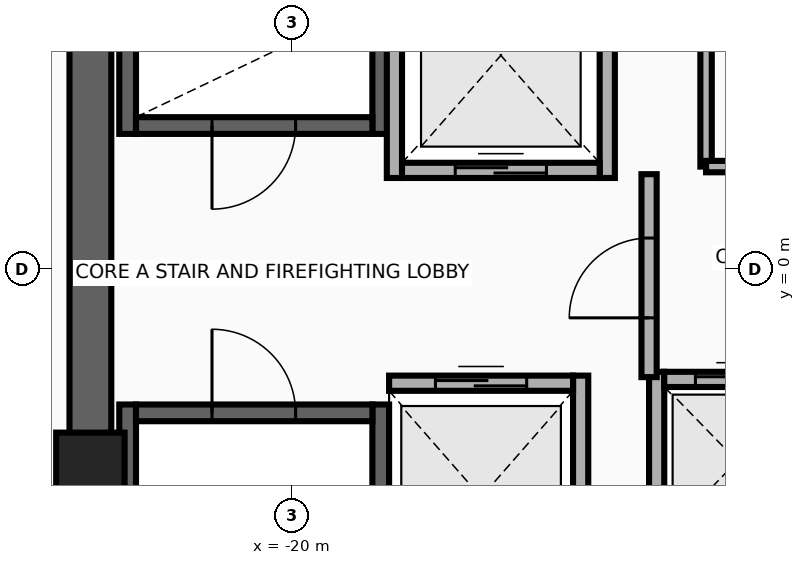
"""IFC4 building model, lengths in metres.
Left out: names, types, materials, properties, quantities, classifications, styles, units other than length and angle.
Written with IfcOpenShell. Run it as: python <this file> out.ifc"""

import sys

from ifc_helpers import new_model, si_unit, direction, frame, frame_2d, origin, origin_2d, place, context, subcontext, project, spatial, rectangle, extrude, source, transform, mapped, element, fill, save


model = new_model("IFC4")
c1 = context("Model", 3, precision=1e-05, world=origin(), true_north=direction((0.0, 1.0)))
c2 = subcontext(c1, "Body", "Model", "MODEL_VIEW")
j1 = project(units=[si_unit("LENGTHUNIT", "METRE"), si_unit("PLANEANGLEUNIT", "RADIAN")], contexts=[c1])
p1 = place(None, origin())
s1 = spatial("IfcSite", under=j1, at=p1, CompositionType="ELEMENT")
p2 = place(p1, origin())
s2 = spatial("IfcBuilding", under=s1, at=p2, CompositionType="ELEMENT")
p3 = place(p2, frame((0.0, 0.0, 223.0)))
s3 = spatial("IfcBuildingStorey", under=s2, at=p3, CompositionType="ELEMENT", Elevation=223.0)
for number, where, z_axis, x_axis in (
    (1, (-22.16, 1.78, 0.0), (0.0, 0.0, 1.0), (0.0, 1.0, 0.0)),
    (2, (-18.83, 1.78, 0.0), (0.0, 0.0, 1.0), (0.0, 1.0, 0.0)),
):
    element("IfcWall", number, at=place(p3, frame(where, z_axis=z_axis, x_axis=x_axis)), inside=s3, PredefinedType="SHEAR", context=c2, shape_type="SweptSolid", body=[
        extrude(rectangle(XDim=8.745, YDim=0.22, at=frame_2d((4.373, 0.0))), origin(), (0.0, 0.0, 1.0), 3.26),
    ])
p4 = place(p3, frame((-22.05, 1.89, 0.0), z_axis=(0.0, 0.0, 1.0), x_axis=(1.0, 0.0, 0.0)))
e3 = element("IfcWall", 3, at=p4, inside=s3, PredefinedType="SHEAR", context=c2, shape_type="SweptSolid", body=[
    extrude(rectangle(XDim=3.11, YDim=0.22, at=frame_2d((1.555, 0.0))), origin(), (0.0, 0.0, 1.0), 3.26),
])
p5 = place(p4, frame((1.0, 0.0, 0.0)))
e4 = element("IfcOpeningElement", 4, at=p5, cuts=e3, PredefinedType="OPENING", context=c2, shape_type="SweptSolid", body=[
    extrude(rectangle(XDim=1.1, YDim=2.15, at=frame_2d((0.55, 1.075))), frame((0.0, 0.125, 0.0), z_axis=(0.0, -1.0, 0.0), x_axis=(1.0, 0.0, 0.0)), (0.0, 0.0, 1.0), 0.25),
])
for number, where, z_axis, x_axis in (
    (5, (-22.16, -10.525, 0.0), (0.0, 0.0, 1.0), (0.0, 1.0, 0.0)),
    (6, (-18.83, -10.525, 0.0), (0.0, 0.0, 1.0), (0.0, 1.0, 0.0)),
):
    element("IfcWall", number, at=place(p3, frame(where, z_axis=z_axis, x_axis=x_axis)), inside=s3, PredefinedType="SHEAR", context=c2, shape_type="SweptSolid", body=[
        extrude(rectangle(XDim=8.745, YDim=0.22, at=frame_2d((4.373, 0.0))), origin(), (0.0, 0.0, 1.0), 3.26),
    ])
p6 = place(p3, frame((-22.05, -1.89, 0.0), z_axis=(0.0, 0.0, 1.0), x_axis=(1.0, 0.0, 0.0)))
e7 = element("IfcWall", 7, at=p6, inside=s3, PredefinedType="SHEAR", context=c2, shape_type="SweptSolid", body=[
    extrude(rectangle(XDim=3.11, YDim=0.22, at=frame_2d((1.555, 0.0))), origin(), (0.0, 0.0, 1.0), 3.26),
])
p7 = place(p6, frame((1.0, 0.0, 0.0)))
e8 = element("IfcOpeningElement", 8, at=p7, cuts=e7, PredefinedType="OPENING", context=c2, shape_type="SweptSolid", body=[
    extrude(rectangle(XDim=1.1, YDim=2.15, at=frame_2d((0.55, 1.075))), frame((0.0, 0.125, 0.0), z_axis=(0.0, -1.0, 0.0), x_axis=(1.0, 0.0, 0.0)), (0.0, 0.0, 1.0), 0.25),
])
p8 = place(p3, frame((-22.65, -11.075, 0.0), z_axis=(0.0, 0.0, 1.0), x_axis=(0.0, 1.0, 0.0)))
e9 = element("IfcWall", 9, at=p8, inside=s3, PredefinedType="SHEAR", context=c2, shape_type="SweptSolid", body=[
    extrude(rectangle(XDim=22.15, YDim=0.55, at=frame_2d((11.075, 0.0))), origin(), (0.0, 0.0, 1.0), 3.26),
])
m1 = source(origin(), c2, "Body", "SweptSolid", [
    extrude(rectangle(XDim=0.9, YDim=0.9, at=origin_2d()), origin(), (0.0, 0.0, 1.0), 3.5),
])
p9 = place(p3, frame((-22.65, -2.6, 0.0), z_axis=(0.0, 0.0, 1.0), x_axis=(1.0, 0.0, 0.0)))
e10 = element("IfcColumn", 10, at=p9, inside=s3, PredefinedType="COLUMN", context=c2, shape_type="MappedRepresentation", body=[
    mapped(m1, transform((0.0, 0.0, 0.0), x_axis=(1.0, 0.0, 0.0), y_axis=(0.0, 1.0, 0.0), z_axis=(0.0, 0.0, 1.0), scale=1.0)),
])
for number, where, z_axis, x_axis in (
    (11, (-18.65, 1.2, 0.0), (0.0, 0.0, 1.0), (0.0, 1.0, 0.0)),
    (12, (-15.85, 1.2, 0.0), (0.0, 0.0, 1.0), (0.0, 1.0, 0.0)),
):
    element("IfcWall", number, at=place(p3, frame(where, z_axis=z_axis, x_axis=x_axis)), inside=s3, PredefinedType="MOVABLE", context=c2, shape_type="SweptSolid", body=[
        extrude(rectangle(XDim=3.225, YDim=0.2, at=frame_2d((1.613, 0.0))), origin(), (0.0, 0.0, 1.0), 3.26),
    ])
p10 = place(p3, frame((-18.55, 1.3, 0.0), z_axis=(0.0, 0.0, 1.0), x_axis=(1.0, 0.0, 0.0)))
e13 = element("IfcWall", 13, at=p10, inside=s3, PredefinedType="MOVABLE", context=c2, shape_type="SweptSolid", body=[
    extrude(rectangle(XDim=2.6, YDim=0.2, at=frame_2d((1.3, 0.0))), origin(), (0.0, 0.0, 1.0), 3.26),
])
p11 = place(p10, frame((0.7, 0.0, 0.0)))
e14 = element("IfcOpeningElement", 14, at=p11, cuts=e13, PredefinedType="OPENING", context=c2, shape_type="SweptSolid", body=[
    extrude(rectangle(XDim=1.2, YDim=2.1, at=frame_2d((0.6, 1.05))), frame((0.0, 0.115, 0.0), z_axis=(0.0, -1.0, 0.0), x_axis=(1.0, 0.0, 0.0)), (0.0, 0.0, 1.0), 0.23),
])
p12 = place(p3, frame((-16.2, -4.6, 0.0), z_axis=(0.0, 0.0, 1.0), x_axis=(0.0, 1.0, 0.0)))
e15 = element("IfcWall", 15, at=p12, inside=s3, PredefinedType="MOVABLE", context=c2, shape_type="SweptSolid", body=[
    extrude(rectangle(XDim=3.2, YDim=0.2, at=frame_2d((1.6, 0.0))), origin(), (0.0, 0.0, 1.0), 3.26),
])
p13 = place(p3, frame((-18.72, -1.5, 0.0), z_axis=(0.0, 0.0, 1.0), x_axis=(1.0, 0.0, 0.0)))
e16 = element("IfcWall", 16, at=p13, inside=s3, PredefinedType="MOVABLE", context=c2, shape_type="SweptSolid", body=[
    extrude(rectangle(XDim=2.42, YDim=0.2, at=frame_2d((1.21, 0.0))), origin(), (0.0, 0.0, 1.0), 3.26),
])
p14 = place(p13, frame((0.61, 0.0, 0.0)))
e17 = element("IfcOpeningElement", 17, at=p14, cuts=e16, PredefinedType="OPENING", context=c2, shape_type="SweptSolid", body=[
    extrude(rectangle(XDim=1.2, YDim=2.1, at=frame_2d((0.6, 1.05))), frame((0.0, 0.115, 0.0), z_axis=(0.0, -1.0, 0.0), x_axis=(1.0, 0.0, 0.0)), (0.0, 0.0, 1.0), 0.23),
])
p15 = place(p3, frame((-15.2, -3.7, 0.0), z_axis=(0.0, 0.0, 1.0), x_axis=(0.0, 1.0, 0.0)))
e18 = element("IfcWall", 18, at=p15, inside=s3, PredefinedType="MOVABLE", context=c2, shape_type="SweptSolid", body=[
    extrude(rectangle(XDim=2.35, YDim=0.2, at=frame_2d((1.175, 0.0))), origin(), (0.0, 0.0, 1.0), 3.26),
])
p16 = place(p3, frame((-15.1, -1.45, 0.0), z_axis=(0.0, 0.0, 1.0), x_axis=(1.0, 0.0, 0.0)))
e19 = element("IfcWall", 19, at=p16, inside=s3, PredefinedType="MOVABLE", context=c2, shape_type="SweptSolid", body=[
    extrude(rectangle(XDim=1.92, YDim=0.2, at=frame_2d((0.96, 0.0))), origin(), (0.0, 0.0, 1.0), 3.26),
])
p17 = place(p16, frame((0.41, 0.0, 0.0)))
e20 = element("IfcOpeningElement", 20, at=p17, cuts=e19, PredefinedType="OPENING", context=c2, shape_type="SweptSolid", body=[
    extrude(rectangle(XDim=1.1, YDim=2.1, at=frame_2d((0.55, 1.05))), frame((0.0, 0.115, 0.0), z_axis=(0.0, -1.0, 0.0), x_axis=(1.0, 0.0, 0.0)), (0.0, 0.0, 1.0), 0.23),
])
p18 = place(p3, frame((-15.3, -1.42, 0.0), z_axis=(0.0, 0.0, 1.0), x_axis=(0.0, 1.0, 0.0)))
e21 = element("IfcWall", 21, at=p18, inside=s3, PredefinedType="PARTITIONING", context=c2, shape_type="SweptSolid", body=[
    extrude(rectangle(XDim=2.67, YDim=0.2, at=frame_2d((1.335, 0.0))), origin(), (0.0, 0.0, 1.0), 3.26),
])
p19 = place(p18, frame((0.78, 0.0, 0.0)))
e22 = element("IfcOpeningElement", 22, at=p19, cuts=e21, PredefinedType="OPENING", context=c2, shape_type="SweptSolid", body=[
    extrude(rectangle(XDim=1.05, YDim=2.15, at=frame_2d((0.525, 1.075))), frame((0.0, 0.115, 0.0), z_axis=(0.0, -1.0, 0.0), x_axis=(1.0, 0.0, 0.0)), (0.0, 0.0, 1.0), 0.23),
])
p20 = place(p3, frame((-14.55, 1.35, 0.0), z_axis=(0.0, 0.0, 1.0), x_axis=(0.0, 1.0, 0.0)))
e23 = element("IfcWall", 23, at=p20, inside=s3, PredefinedType="PARTITIONING", context=c2, shape_type="SweptSolid", body=[
    extrude(rectangle(XDim=1.95, YDim=0.15, at=frame_2d((0.975, 0.0))), origin(), (0.0, 0.0, 1.0), 3.26),
])
p21 = place(p3, frame((-14.55, 1.35, 0.0), z_axis=(0.0, 0.0, 1.0), x_axis=(1.0, 0.0, 0.0)))
e24 = element("IfcWall", 24, at=p21, inside=s3, PredefinedType="PARTITIONING", context=c2, shape_type="SweptSolid", body=[
    extrude(rectangle(XDim=1.4, YDim=0.15, at=frame_2d((0.7, 0.0))), origin(), (0.0, 0.0, 1.0), 3.26),
])
p22 = place(p21, frame((0.275, 0.0, 0.0)))
e25 = element("IfcOpeningElement", 25, at=p22, cuts=e24, PredefinedType="OPENING", context=c2, shape_type="SweptSolid", body=[
    extrude(rectangle(XDim=0.85, YDim=2.05, at=frame_2d((0.425, 1.025))), frame((0.0, 0.09, 0.0), z_axis=(0.0, -1.0, 0.0), x_axis=(1.0, 0.0, 0.0)), (0.0, 0.0, 1.0), 0.18),
])
p23 = place(p11, origin())
e26 = element("IfcDoor", 26, at=p23, inside=s3, OperationType="DOUBLE_DOOR_SLIDING", PredefinedType="DOOR", context=c2, shape_type="SweptSolid", body=[
    extrude(rectangle(XDim=1.2, YDim=2.1, at=frame_2d((0.6, 1.05))), frame((0.0, 0.025, 0.0), z_axis=(0.0, -1.0, 0.0), x_axis=(1.0, 0.0, 0.0)), (0.0, 0.0, 1.0), 0.05),
])
fill(e14, e26)
p24 = place(p14, origin())
e27 = element("IfcDoor", 27, at=p24, inside=s3, OperationType="DOUBLE_DOOR_SLIDING", PredefinedType="DOOR", context=c2, shape_type="SweptSolid", body=[
    extrude(rectangle(XDim=1.2, YDim=2.1, at=frame_2d((0.6, 1.05))), frame((0.0, 0.025, 0.0), z_axis=(0.0, -1.0, 0.0), x_axis=(1.0, 0.0, 0.0)), (0.0, 0.0, 1.0), 0.05),
])
fill(e17, e27)
p25 = place(p17, origin())
e28 = element("IfcDoor", 28, at=p25, inside=s3, OperationType="DOUBLE_DOOR_SLIDING", PredefinedType="DOOR", context=c2, shape_type="SweptSolid", body=[
    extrude(rectangle(XDim=1.1, YDim=2.1, at=frame_2d((0.55, 1.05))), frame((0.0, 0.025, 0.0), z_axis=(0.0, -1.0, 0.0), x_axis=(1.0, 0.0, 0.0)), (0.0, 0.0, 1.0), 0.05),
])
fill(e20, e28)
p26 = place(p19, origin())
e29 = element("IfcDoor", 29, at=p26, inside=s3, OperationType="SINGLE_SWING_RIGHT", PredefinedType="DOOR", context=c2, shape_type="SweptSolid", body=[
    extrude(rectangle(XDim=1.05, YDim=2.15, at=frame_2d((0.525, 1.075))), frame((0.0, 0.025, 0.0), z_axis=(0.0, -1.0, 0.0), x_axis=(1.0, 0.0, 0.0)), (0.0, 0.0, 1.0), 0.05),
])
fill(e22, e29)
p27 = place(p5, frame((1.1, 0.0, 0.0), z_axis=(0.0, 0.0, 1.0), x_axis=(-1.0, 0.0, 0.0)))
e30 = element("IfcDoor", 30, at=p27, inside=s3, OperationType="SINGLE_SWING_LEFT", PredefinedType="DOOR", context=c2, shape_type="SweptSolid", body=[
    extrude(rectangle(XDim=1.1, YDim=2.15, at=frame_2d((0.55, 1.075))), frame((0.0, 0.025, 0.0), z_axis=(0.0, -1.0, 0.0), x_axis=(1.0, 0.0, 0.0)), (0.0, 0.0, 1.0), 0.05),
])
fill(e4, e30)
p28 = place(p7, origin())
e31 = element("IfcDoor", 31, at=p28, inside=s3, OperationType="SINGLE_SWING_RIGHT", PredefinedType="DOOR", context=c2, shape_type="SweptSolid", body=[
    extrude(rectangle(XDim=1.1, YDim=2.15, at=frame_2d((0.55, 1.075))), frame((0.0, 0.025, 0.0), z_axis=(0.0, -1.0, 0.0), x_axis=(1.0, 0.0, 0.0)), (0.0, 0.0, 1.0), 0.05),
])
fill(e8, e31)
save(model, sys.argv[1])
